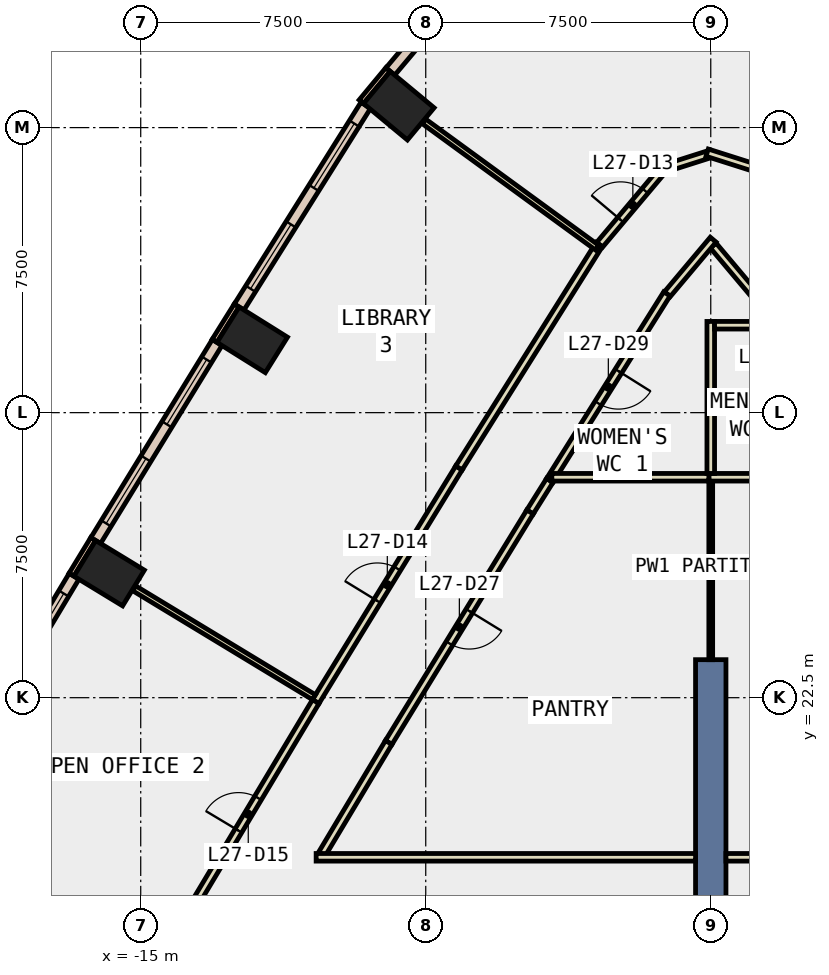
"""IFC4 building model, lengths in metres.
Left out: names, types, materials, properties, quantities, classifications, styles, units other than length and angle.
Written with IfcOpenShell. Run it as: python <this file> out.ifc"""

import sys

from ifc_helpers import new_model, si_unit, direction, frame, frame_2d, origin, origin_2d, place, context, subcontext, project, spatial, rectangle, extrude, element, fill, save


model = new_model("IFC4")
c1 = context("Model", 3, precision=1e-05, world=origin(), true_north=direction((0.0, 1.0)))
c2 = subcontext(c1, "Body", "Model", "MODEL_VIEW")
j1 = project(units=[si_unit("LENGTHUNIT", "METRE"), si_unit("PLANEANGLEUNIT", "RADIAN")], contexts=[c1])
p1 = place(None, origin())
s1 = spatial("IfcSite", under=j1, at=p1, CompositionType="ELEMENT")
p2 = place(p1, origin())
s2 = spatial("IfcBuilding", under=s1, at=p2, CompositionType="ELEMENT")
p3 = place(p2, frame((0.0, 0.0, 124.4)))
s3 = spatial("IfcBuildingStorey", under=s2, at=p3, CompositionType="ELEMENT", Elevation=124.4)
for number, where, z_axis, x_axis in (
    (1, (-8.208, 38.077, -0.4), (0.0, 0.0, 1.0), (0.638, 0.77, 0.0)),
    (2, (-12.066, 31.917, -0.4), (0.0, 0.0, 1.0), (0.53, 0.848, 0.0)),
    (3, (-15.831, 25.776, -0.4), (0.0, 0.0, 1.0), (0.52, 0.854, 0.0)),
):
    element("IfcColumn", number, at=place(p3, frame(where, z_axis=z_axis, x_axis=x_axis)), inside=s3, PredefinedType="COLUMN", context=c2, shape_type="SweptSolid", body=[
        extrude(rectangle(XDim=1.1, YDim=1.5, at=origin_2d()), origin(), (0.0, 0.0, 1.0), 4.2),
    ])
p4 = place(p3, frame((0.0, 14.5, -0.4), z_axis=(0.0, 0.0, 1.0), x_axis=(0.0, 1.0, 0.0)))
e4 = element("IfcWall", 4, at=p4, inside=s3, PredefinedType="SHEAR", context=c2, shape_type="SweptSolid", body=[
    extrude(rectangle(XDim=9.0, YDim=0.8, at=frame_2d((4.5, 0.0))), origin(), (0.0, 0.0, 1.0), 4.2),
])
p5 = place(p3, frame((-8.492, 39.027, 0.0), z_axis=(0.0, 0.0, 1.0), x_axis=(-0.638566874111, -0.769566337159, 0.0)))
e5 = element("IfcWall", 5, at=p5, inside=s3, PredefinedType="STANDARD", context=c2, shape_type="SweptSolid", body=[
    extrude(rectangle(XDim=1.1, YDim=0.15, at=frame_2d((0.55, 0.0))), origin(), (0.0, 0.0, 1.0), 3.8),
])
p6 = place(p3, frame((-12.474, 32.821, 0.0), z_axis=(0.0, 0.0, 1.0), x_axis=(-0.529719642941, -0.848172800721, 0.0)))
e6 = element("IfcWall", 6, at=p6, inside=s3, PredefinedType="STANDARD", context=c2, shape_type="SweptSolid", body=[
    extrude(rectangle(XDim=1.1, YDim=0.15, at=frame_2d((0.55, 0.0))), origin(), (0.0, 0.0, 1.0), 3.8),
])
p7 = place(p3, frame((-16.25, 26.675, 0.0), z_axis=(0.0, 0.0, 1.0), x_axis=(-0.519869515594, -0.854245682901, 0.0)))
e7 = element("IfcWall", 7, at=p7, inside=s3, PredefinedType="STANDARD", context=c2, shape_type="SweptSolid", body=[
    extrude(rectangle(XDim=1.1, YDim=0.15, at=frame_2d((0.55, 0.0))), origin(), (0.0, 0.0, 1.0), 3.8),
])
p8 = place(p3, frame((-5.767, 42.142, 0.0), z_axis=(0.0, 0.0, 1.0), x_axis=(-0.643948600943, -0.765068754652, 0.0)))
e8 = element("IfcWall", 8, at=p8, inside=s3, PredefinedType="STANDARD", context=c2, shape_type="SweptSolid", body=[
    extrude(rectangle(XDim=4.138, YDim=0.3, at=frame_2d((2.069, 0.0))), origin(), (0.0, 0.0, 1.0), 3.8),
])
p9 = place(p8, frame((1.369, 0.0, 0.9)))
e9 = element("IfcOpeningElement", 9, at=p9, cuts=e8, PredefinedType="OPENING", context=c2, shape_type="SweptSolid", body=[
    extrude(rectangle(XDim=1.4, YDim=2.6, at=frame_2d((0.7, 1.3))), frame((0.0, 0.16, 0.0), z_axis=(0.0, -1.0, 0.0), x_axis=(1.0, 0.0, 0.0)), (0.0, 0.0, 1.0), 0.32),
])
p10 = place(p3, frame((-9.079, 38.086, 0.0), z_axis=(0.0, 0.0, 1.0), x_axis=(-0.53160564075, -0.846991996847, 0.0)))
e10 = element("IfcWall", 10, at=p10, inside=s3, PredefinedType="STANDARD", context=c2, shape_type="SweptSolid", body=[
    extrude(rectangle(XDim=6.266, YDim=0.3, at=frame_2d((3.133, 0.0))), origin(), (0.0, 0.0, 1.0), 3.8),
])
p11 = place(p10, frame((0.566, 0.0, 0.9)))
e11 = element("IfcOpeningElement", 11, at=p11, cuts=e10, PredefinedType="OPENING", context=c2, shape_type="SweptSolid", body=[
    extrude(rectangle(XDim=2.0, YDim=2.6, at=frame_2d((1.0, 1.3))), frame((0.0, 0.16, 0.0), z_axis=(0.0, -1.0, 0.0), x_axis=(1.0, 0.0, 0.0)), (0.0, 0.0, 1.0), 0.32),
])
p12 = place(p10, frame((3.699, 0.0, 0.9)))
e12 = element("IfcOpeningElement", 12, at=p12, cuts=e10, PredefinedType="OPENING", context=c2, shape_type="SweptSolid", body=[
    extrude(rectangle(XDim=2.0, YDim=2.6, at=frame_2d((1.0, 1.3))), frame((0.0, 0.16, 0.0), z_axis=(0.0, -1.0, 0.0), x_axis=(1.0, 0.0, 0.0)), (0.0, 0.0, 1.0), 0.32),
])
p13 = place(p3, frame((-12.989, 31.846, 0.0), z_axis=(0.0, 0.0, 1.0), x_axis=(-0.522757750181, -0.8524812811, 0.0)))
e13 = element("IfcWall", 13, at=p13, inside=s3, PredefinedType="STANDARD", context=c2, shape_type="SweptSolid", body=[
    extrude(rectangle(XDim=6.114, YDim=0.3, at=frame_2d((3.057, 0.0))), origin(), (0.0, 0.0, 1.0), 3.8),
])
p14 = place(p13, frame((0.528, 0.0, 0.9)))
e14 = element("IfcOpeningElement", 14, at=p14, cuts=e13, PredefinedType="OPENING", context=c2, shape_type="SweptSolid", body=[
    extrude(rectangle(XDim=2.0, YDim=2.6, at=frame_2d((1.0, 1.3))), frame((0.0, 0.16, 0.0), z_axis=(0.0, -1.0, 0.0), x_axis=(1.0, 0.0, 0.0)), (0.0, 0.0, 1.0), 0.32),
])
p15 = place(p13, frame((3.585, 0.0, 0.9)))
e15 = element("IfcOpeningElement", 15, at=p15, cuts=e13, PredefinedType="OPENING", context=c2, shape_type="SweptSolid", body=[
    extrude(rectangle(XDim=2.0, YDim=2.6, at=frame_2d((1.0, 1.3))), frame((0.0, 0.16, 0.0), z_axis=(0.0, -1.0, 0.0), x_axis=(1.0, 0.0, 0.0)), (0.0, 0.0, 1.0), 0.32),
])
p16 = place(p3, frame((-16.754, 25.695, 0.0), z_axis=(0.0, 0.0, 1.0), x_axis=(-0.513708729904, -0.857964650099, 0.0)))
e16 = element("IfcWall", 16, at=p16, inside=s3, PredefinedType="STANDARD", context=c2, shape_type="SweptSolid", body=[
    extrude(rectangle(XDim=6.115, YDim=0.3, at=frame_2d((3.057, 0.0))), origin(), (0.0, 0.0, 1.0), 3.8),
])
p17 = place(p16, frame((0.529, 0.0, 0.9)))
e17 = element("IfcOpeningElement", 17, at=p17, cuts=e16, PredefinedType="OPENING", context=c2, shape_type="SweptSolid", body=[
    extrude(rectangle(XDim=2.0, YDim=2.6, at=frame_2d((1.0, 1.3))), frame((0.0, 0.16, 0.0), z_axis=(0.0, -1.0, 0.0), x_axis=(1.0, 0.0, 0.0)), (0.0, 0.0, 1.0), 0.32),
])
p18 = place(p16, frame((3.586, 0.0, 0.9)))
e18 = element("IfcOpeningElement", 18, at=p18, cuts=e16, PredefinedType="OPENING", context=c2, shape_type="SweptSolid", body=[
    extrude(rectangle(XDim=2.0, YDim=2.6, at=frame_2d((1.0, 1.3))), frame((0.0, 0.16, 0.0), z_axis=(0.0, -1.0, 0.0), x_axis=(1.0, 0.0, 0.0)), (0.0, 0.0, 1.0), 0.32),
])
p19 = place(p3, frame((-4.236, 28.215, 0.0), z_axis=(0.0, 0.0, 1.0), x_axis=(-0.531343659666, -0.84715637006, 0.0)))
e19 = element("IfcWall", 19, at=p19, inside=s3, PredefinedType="PARTITIONING", context=c2, shape_type="SweptSolid", body=[
    extrude(rectangle(XDim=0.979, YDim=0.2, at=frame_2d((0.489, 0.0))), origin(), (0.0, 0.0, 1.0), 3.8),
])
p20 = place(p3, frame((-4.756, 27.386, 0.0), z_axis=(0.0, 0.0, 1.0), x_axis=(-0.522743103274, -0.852490262689, 0.0)))
e20 = element("IfcWall", 20, at=p20, inside=s3, PredefinedType="PARTITIONING", context=c2, shape_type="SweptSolid", body=[
    extrude(rectangle(XDim=7.115, YDim=0.2, at=frame_2d((3.557, 0.0))), origin(), (0.0, 0.0, 1.0), 3.8),
])
p21 = place(p20, frame((3.057, 0.0, 0.0)))
e21 = element("IfcOpeningElement", 21, at=p21, cuts=e20, PredefinedType="OPENING", context=c2, shape_type="SweptSolid", body=[
    extrude(rectangle(XDim=1.0, YDim=2.1, at=frame_2d((0.5, 1.05))), frame((0.0, 0.11, 0.0), z_axis=(0.0, -1.0, 0.0), x_axis=(1.0, 0.0, 0.0)), (0.0, 0.0, 1.0), 0.22),
])
p22 = place(p3, frame((-8.475, 21.321, 0.0), z_axis=(0.0, 0.0, 1.0), x_axis=(-0.513592824646, -0.858034038062, 0.0)))
e22 = element("IfcWall", 22, at=p22, inside=s3, PredefinedType="PARTITIONING", context=c2, shape_type="SweptSolid", body=[
    extrude(rectangle(XDim=3.421, YDim=0.2, at=frame_2d((1.71, 0.0))), origin(), (0.0, 0.0, 1.0), 3.8),
])
p23 = place(p3, frame((1.271, 32.964, 0.0), z_axis=(0.0, 0.0, 1.0), x_axis=(-0.644007376392, 0.765019280249, 0.0)))
e23 = element("IfcWall", 23, at=p23, inside=s3, PredefinedType="PARTITIONING", context=c2, shape_type="SweptSolid", body=[
    extrude(rectangle(XDim=1.874, YDim=0.2, at=frame_2d((0.937, 0.0))), origin(), (0.0, 0.0, 1.0), 3.8),
])
p24 = place(p3, frame((0.064, 34.551, 0.0), z_axis=(0.0, 0.0, 1.0), x_axis=(-0.643638095982, -0.765329995101, 0.0)))
e24 = element("IfcWall", 24, at=p24, inside=s3, PredefinedType="PARTITIONING", context=c2, shape_type="SweptSolid", body=[
    extrude(rectangle(XDim=1.874, YDim=0.2, at=frame_2d((0.937, 0.0))), origin(), (0.0, 0.0, 1.0), 3.8),
])
p25 = place(p3, frame((-1.154, 33.125, 0.0), z_axis=(0.0, 0.0, 1.0), x_axis=(-0.531652223099, -0.846962758139, 0.0)))
e25 = element("IfcWall", 25, at=p25, inside=s3, PredefinedType="PARTITIONING", context=c2, shape_type="SweptSolid", body=[
    extrude(rectangle(XDim=5.797, YDim=0.2, at=frame_2d((2.898, 0.0))), origin(), (0.0, 0.0, 1.0), 3.8),
])
p26 = place(p25, frame((2.399, 0.0, 0.0)))
e26 = element("IfcOpeningElement", 26, at=p26, cuts=e25, PredefinedType="OPENING", context=c2, shape_type="SweptSolid", body=[
    extrude(rectangle(XDim=1.0, YDim=2.1, at=frame_2d((0.5, 1.05))), frame((0.0, 0.11, 0.0), z_axis=(0.0, -1.0, 0.0), x_axis=(1.0, 0.0, 0.0)), (0.0, 0.0, 1.0), 0.22),
])
p27 = place(p3, frame((-2.924, 34.417, 0.0), z_axis=(0.0, 0.0, 1.0), x_axis=(0.644113583568, 0.764929860486, 0.0)))
e27 = element("IfcWall", 27, at=p27, inside=s3, PredefinedType="PARTITIONING", context=c2, shape_type="SweptSolid", body=[
    extrude(rectangle(XDim=2.714, YDim=0.2, at=frame_2d((1.357, 0.0))), origin(), (0.0, 0.0, 1.0), 3.8),
])
p28 = place(p27, frame((0.857, 0.0, 0.0)))
e28 = element("IfcOpeningElement", 28, at=p28, cuts=e27, PredefinedType="OPENING", context=c2, shape_type="SweptSolid", body=[
    extrude(rectangle(XDim=1.0, YDim=2.1, at=frame_2d((0.5, 1.05))), frame((0.0, 0.11, 0.0), z_axis=(0.0, -1.0, 0.0), x_axis=(1.0, 0.0, 0.0)), (0.0, 0.0, 1.0), 0.22),
])
p29 = place(p3, frame((-1.145, 36.447, 0.0), z_axis=(0.0, 0.0, 1.0), x_axis=(0.952957783381, 0.303103056886, 0.0)))
e29 = element("IfcWall", 29, at=p29, inside=s3, PredefinedType="PARTITIONING", context=c2, shape_type="SweptSolid", body=[
    extrude(rectangle(XDim=1.102, YDim=0.2, at=frame_2d((0.551, 0.0))), origin(), (0.0, 0.0, 1.0), 3.8),
])
p30 = place(p3, frame((-0.095, 36.841, 0.0), z_axis=(0.0, 0.0, 1.0), x_axis=(0.953036611979, -0.302855107646, 0.0)))
e30 = element("IfcWall", 30, at=p30, inside=s3, PredefinedType="PARTITIONING", context=c2, shape_type="SweptSolid", body=[
    extrude(rectangle(XDim=1.301, YDim=0.2, at=frame_2d((0.65, 0.0))), origin(), (0.0, 0.0, 1.0), 3.8),
])
p31 = place(p3, frame((-10.396, 22.397, 0.0), z_axis=(0.0, 0.0, 1.0), x_axis=(0.522695398968, 0.852519512913, 0.0)))
e31 = element("IfcWall", 31, at=p31, inside=s3, PredefinedType="PARTITIONING", context=c2, shape_type="SweptSolid", body=[
    extrude(rectangle(XDim=7.213, YDim=0.2, at=frame_2d((3.606, 0.0))), origin(), (0.0, 0.0, 1.0), 3.8),
])
p32 = place(p31, frame((3.106, 0.0, 0.0)))
e32 = element("IfcOpeningElement", 32, at=p32, cuts=e31, PredefinedType="OPENING", context=c2, shape_type="SweptSolid", body=[
    extrude(rectangle(XDim=1.0, YDim=2.1, at=frame_2d((0.5, 1.05))), frame((0.0, 0.11, 0.0), z_axis=(0.0, -1.0, 0.0), x_axis=(1.0, 0.0, 0.0)), (0.0, 0.0, 1.0), 0.22),
])
p33 = place(p3, frame((-6.626, 28.546, 0.0), z_axis=(0.0, 0.0, 1.0), x_axis=(0.531701842465, 0.846931609234, 0.0)))
e33 = element("IfcWall", 33, at=p33, inside=s3, PredefinedType="PARTITIONING", context=c2, shape_type="SweptSolid", body=[
    extrude(rectangle(XDim=6.942, YDim=0.2, at=frame_2d((3.471, 0.0))), origin(), (0.0, 0.0, 1.0), 3.8),
])
p34 = place(p3, frame((-14.023, 16.338, 0.0), z_axis=(0.0, 0.0, 1.0), x_axis=(0.513773581048, 0.857925816966, 0.0)))
e34 = element("IfcWall", 34, at=p34, inside=s3, PredefinedType="PARTITIONING", context=c2, shape_type="SweptSolid", body=[
    extrude(rectangle(XDim=7.061, YDim=0.2, at=frame_2d((3.531, 0.0))), origin(), (0.0, 0.0, 1.0), 3.8),
])
p35 = place(p34, frame((3.106, 0.0, 0.0)))
e35 = element("IfcOpeningElement", 35, at=p35, cuts=e34, PredefinedType="OPENING", context=c2, shape_type="SweptSolid", body=[
    extrude(rectangle(XDim=1.0, YDim=2.1, at=frame_2d((0.5, 1.05))), frame((0.0, 0.11, 0.0), z_axis=(0.0, -1.0, 0.0), x_axis=(1.0, 0.0, 0.0)), (0.0, 0.0, 1.0), 0.22),
])
for number, where, z_axis, x_axis in (
    (36, (0.4, 18.3, 0.0), (0.0, 0.0, 1.0), (1.0, 0.0, 0.0)),
    (37, (-10.384, 18.3, 0.0), (0.0, 0.0, 1.0), (1.0, 0.0, 0.0)),
):
    element("IfcWall", number, at=place(p3, frame(where, z_axis=z_axis, x_axis=x_axis)), inside=s3, PredefinedType="PARTITIONING", context=c2, shape_type="SweptSolid", body=[
        extrude(rectangle(XDim=9.984, YDim=0.2, at=frame_2d((4.992, 0.0))), origin(), (0.0, 0.0, 1.0), 3.8),
    ])
p36 = place(p3, frame((0.0, 23.5, 0.0), z_axis=(0.0, 0.0, 1.0), x_axis=(0.0, 1.0, 0.0)))
e38 = element("IfcWall", 38, at=p36, inside=s3, PredefinedType="PARTITIONING", context=c2, shape_type="SweptSolid", body=[
    extrude(rectangle(XDim=4.9, YDim=0.1, at=frame_2d((2.45, 0.0))), origin(), (0.0, 0.0, 1.0), 3.8),
])
p37 = place(p3, frame((-0.05, 28.3, 0.0), z_axis=(0.0, 0.0, 1.0), x_axis=(1.0, 0.0, 0.0)))
e39 = element("IfcWall", 39, at=p37, inside=s3, PredefinedType="PARTITIONING", context=c2, shape_type="SweptSolid", body=[
    extrude(rectangle(XDim=4.232, YDim=0.2, at=frame_2d((2.116, 0.0))), origin(), (0.0, 0.0, 1.0), 3.8),
])
p38 = place(p3, frame((-4.182, 28.3, 0.0), z_axis=(0.0, 0.0, 1.0), x_axis=(1.0, 0.0, 0.0)))
e40 = element("IfcWall", 40, at=p38, inside=s3, PredefinedType="PARTITIONING", context=c2, shape_type="SweptSolid", body=[
    extrude(rectangle(XDim=4.132, YDim=0.2, at=frame_2d((2.066, 0.0))), origin(), (0.0, 0.0, 1.0), 3.8),
])
p39 = place(p3, frame((0.0, 28.4, 0.0), z_axis=(0.0, 0.0, 1.0), x_axis=(0.0, 1.0, 0.0)))
e41 = element("IfcWall", 41, at=p39, inside=s3, PredefinedType="PARTITIONING", context=c2, shape_type="SweptSolid", body=[
    extrude(rectangle(XDim=4.0, YDim=0.2, at=frame_2d((2.0, 0.0))), origin(), (0.0, 0.0, 1.0), 3.8),
])
p40 = place(p3, frame((0.1, 32.3, 0.0), z_axis=(0.0, 0.0, 1.0), x_axis=(1.0, 0.0, 0.0)))
e42 = element("IfcWall", 42, at=p40, inside=s3, PredefinedType="PARTITIONING", context=c2, shape_type="SweptSolid", body=[
    extrude(rectangle(XDim=1.572, YDim=0.2, at=frame_2d((0.786, 0.0))), origin(), (0.0, 0.0, 1.0), 3.8),
])
p41 = place(p3, frame((-2.989, 34.34, 0.0), z_axis=(0.0, 0.0, 1.0), x_axis=(-0.807932877043, 0.589274525322, 0.0)))
e43 = element("IfcWall", 43, at=p41, inside=s3, PredefinedType="PARTITIONING", context=c2, shape_type="SweptSolid", body=[
    extrude(rectangle(XDim=5.644, YDim=0.15, at=frame_2d((2.822, 0.0))), origin(), (0.0, 0.0, 1.0), 3.8),
])
p42 = place(p3, frame((-10.442, 22.513, 0.0), z_axis=(0.0, 0.0, 1.0), x_axis=(-0.855343076014, 0.518061986943, 0.0)))
e44 = element("IfcWall", 44, at=p42, inside=s3, PredefinedType="PARTITIONING", context=c2, shape_type="SweptSolid", body=[
    extrude(rectangle(XDim=5.53, YDim=0.15, at=frame_2d((2.765, 0.0))), origin(), (0.0, 0.0, 1.0), 3.8),
])
p43 = place(p11, origin())
e45 = element("IfcWindow", 45, at=p43, inside=s3, PartitioningType="SINGLE_PANEL", PredefinedType="WINDOW", context=c2, shape_type="SweptSolid", body=[
    extrude(rectangle(XDim=2.0, YDim=2.6, at=frame_2d((1.0, 1.3))), frame((0.0, 0.03, 0.0), z_axis=(0.0, -1.0, 0.0), x_axis=(1.0, 0.0, 0.0)), (0.0, 0.0, 1.0), 0.06),
])
fill(e11, e45)
p44 = place(p12, origin())
e46 = element("IfcWindow", 46, at=p44, inside=s3, PartitioningType="SINGLE_PANEL", PredefinedType="WINDOW", context=c2, shape_type="SweptSolid", body=[
    extrude(rectangle(XDim=2.0, YDim=2.6, at=frame_2d((1.0, 1.3))), frame((0.0, 0.03, 0.0), z_axis=(0.0, -1.0, 0.0), x_axis=(1.0, 0.0, 0.0)), (0.0, 0.0, 1.0), 0.06),
])
fill(e12, e46)
p45 = place(p14, origin())
e47 = element("IfcWindow", 47, at=p45, inside=s3, PartitioningType="SINGLE_PANEL", PredefinedType="WINDOW", context=c2, shape_type="SweptSolid", body=[
    extrude(rectangle(XDim=2.0, YDim=2.6, at=frame_2d((1.0, 1.3))), frame((0.0, 0.03, 0.0), z_axis=(0.0, -1.0, 0.0), x_axis=(1.0, 0.0, 0.0)), (0.0, 0.0, 1.0), 0.06),
])
fill(e14, e47)
p46 = place(p15, origin())
e48 = element("IfcWindow", 48, at=p46, inside=s3, PartitioningType="SINGLE_PANEL", PredefinedType="WINDOW", context=c2, shape_type="SweptSolid", body=[
    extrude(rectangle(XDim=2.0, YDim=2.6, at=frame_2d((1.0, 1.3))), frame((0.0, 0.03, 0.0), z_axis=(0.0, -1.0, 0.0), x_axis=(1.0, 0.0, 0.0)), (0.0, 0.0, 1.0), 0.06),
])
fill(e15, e48)
p47 = place(p17, origin())
e49 = element("IfcWindow", 49, at=p47, inside=s3, PartitioningType="SINGLE_PANEL", PredefinedType="WINDOW", context=c2, shape_type="SweptSolid", body=[
    extrude(rectangle(XDim=2.0, YDim=2.6, at=frame_2d((1.0, 1.3))), frame((0.0, 0.03, 0.0), z_axis=(0.0, -1.0, 0.0), x_axis=(1.0, 0.0, 0.0)), (0.0, 0.0, 1.0), 0.06),
])
fill(e17, e49)
p48 = place(p28, origin())
e50 = element("IfcDoor", 50, at=p48, inside=s3, OperationType="SINGLE_SWING_LEFT", PredefinedType="DOOR", context=c2, shape_type="SweptSolid", body=[
    extrude(rectangle(XDim=1.0, YDim=2.1, at=frame_2d((0.5, 1.05))), frame((0.0, 0.025, 0.0), z_axis=(0.0, -1.0, 0.0), x_axis=(1.0, 0.0, 0.0)), (0.0, 0.0, 1.0), 0.05),
])
fill(e28, e50)
p49 = place(p32, origin())
e51 = element("IfcDoor", 51, at=p49, inside=s3, OperationType="SINGLE_SWING_LEFT", PredefinedType="DOOR", context=c2, shape_type="SweptSolid", body=[
    extrude(rectangle(XDim=1.0, YDim=2.1, at=frame_2d((0.5, 1.05))), frame((0.0, 0.025, 0.0), z_axis=(0.0, -1.0, 0.0), x_axis=(1.0, 0.0, 0.0)), (0.0, 0.0, 1.0), 0.05),
])
fill(e32, e51)
p50 = place(p35, origin())
e52 = element("IfcDoor", 52, at=p50, inside=s3, OperationType="SINGLE_SWING_LEFT", PredefinedType="DOOR", context=c2, shape_type="SweptSolid", body=[
    extrude(rectangle(XDim=1.0, YDim=2.1, at=frame_2d((0.5, 1.05))), frame((0.0, 0.025, 0.0), z_axis=(0.0, -1.0, 0.0), x_axis=(1.0, 0.0, 0.0)), (0.0, 0.0, 1.0), 0.05),
])
fill(e35, e52)
p51 = place(p21, origin())
e53 = element("IfcDoor", 53, at=p51, inside=s3, OperationType="SINGLE_SWING_RIGHT", PredefinedType="DOOR", context=c2, shape_type="SweptSolid", body=[
    extrude(rectangle(XDim=1.0, YDim=2.1, at=frame_2d((0.5, 1.05))), frame((0.0, 0.025, 0.0), z_axis=(0.0, -1.0, 0.0), x_axis=(1.0, 0.0, 0.0)), (0.0, 0.0, 1.0), 0.05),
])
fill(e21, e53)
p52 = place(p26, origin())
e54 = element("IfcDoor", 54, at=p52, inside=s3, OperationType="SINGLE_SWING_LEFT", PredefinedType="DOOR", context=c2, shape_type="SweptSolid", body=[
    extrude(rectangle(XDim=1.0, YDim=2.1, at=frame_2d((0.5, 1.05))), frame((0.0, 0.025, 0.0), z_axis=(0.0, -1.0, 0.0), x_axis=(1.0, 0.0, 0.0)), (0.0, 0.0, 1.0), 0.05),
])
fill(e26, e54)
save(model, sys.argv[1])
